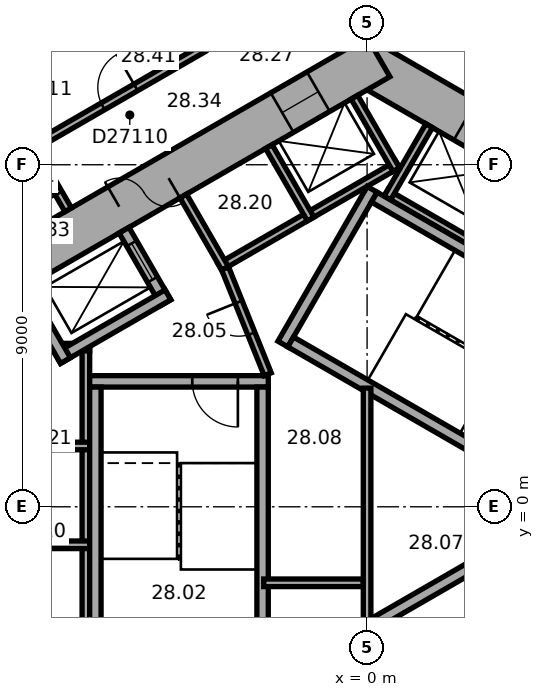
"""IFC4 building model, lengths in metres.
Left out: names, types, materials, properties, quantities, classifications, styles, units other than length and angle.
Written with IfcOpenShell. Run it as: python <this file> out.ifc"""

import sys

from ifc_helpers import new_model, si_unit, direction, frame, frame_2d, origin, place, context, subcontext, project, spatial, rectangle, extrude, element, fill, save


model = new_model("IFC4")
c1 = context("Model", 3, precision=1e-05, world=origin(), true_north=direction((0.0, 1.0)))
c2 = subcontext(c1, "Body", "Model", "MODEL_VIEW")
j1 = project(units=[si_unit("LENGTHUNIT", "METRE"), si_unit("PLANEANGLEUNIT", "RADIAN")], contexts=[c1])
p1 = place(None, origin())
s1 = spatial("IfcSite", under=j1, at=p1, CompositionType="ELEMENT")
p2 = place(p1, origin())
s2 = spatial("IfcBuilding", under=s1, at=p2, CompositionType="ELEMENT")
p3 = place(p2, frame((0.0, 0.0, 116.6)))
s3 = spatial("IfcBuildingStorey", under=s2, at=p3, CompositionType="ELEMENT", Elevation=116.6)
p4 = place(p3, frame((10.4, 5.658, 0.0), z_axis=(0.0, 0.0, 1.0), x_axis=(-0.866021384402, 0.500006961711, 0.0)))
e1 = element("IfcWall", 1, at=p4, inside=s3, PredefinedType="SHEAR", context=c2, shape_type="SweptSolid", body=[
    extrude(rectangle(XDim=12.355, YDim=1.2, at=frame_2d((6.178, 0.0))), origin(), (0.0, 0.0, 1.0), 3.3),
])
p5 = place(p4, frame((2.728, 0.0, 0.0)))
e2 = element("IfcOpeningElement", 2, at=p5, cuts=e1, PredefinedType="OPENING", context=c2, shape_type="SweptSolid", body=[
    extrude(rectangle(XDim=1.1, YDim=2.1, at=frame_2d((0.55, 1.05))), frame((0.0, 0.61, 0.0), z_axis=(0.0, -1.0, 0.0), x_axis=(1.0, 0.0, 0.0)), (0.0, 0.0, 1.0), 1.22),
])
p6 = place(p4, frame((5.328, 0.0, 0.0)))
e3 = element("IfcOpeningElement", 3, at=p6, cuts=e1, PredefinedType="OPENING", context=c2, shape_type="SweptSolid", body=[
    extrude(rectangle(XDim=1.1, YDim=2.1, at=frame_2d((0.55, 1.05))), frame((0.0, 0.61, 0.0), z_axis=(0.0, -1.0, 0.0), x_axis=(1.0, 0.0, 0.0)), (0.0, 0.0, 1.0), 1.22),
])
p7 = place(p4, frame((7.928, 0.0, 0.0)))
e4 = element("IfcOpeningElement", 4, at=p7, cuts=e1, PredefinedType="OPENING", context=c2, shape_type="SweptSolid", body=[
    extrude(rectangle(XDim=1.1, YDim=2.1, at=frame_2d((0.55, 1.05))), frame((0.0, 0.61, 0.0), z_axis=(0.0, -1.0, 0.0), x_axis=(1.0, 0.0, 0.0)), (0.0, 0.0, 1.0), 1.22),
])
p8 = place(p3, frame((0.3, 11.836, 0.0), z_axis=(0.0, 0.0, 1.0), x_axis=(-0.866021384402, -0.500006961711, 0.0)))
e5 = element("IfcWall", 5, at=p8, inside=s3, PredefinedType="SHEAR", context=c2, shape_type="SweptSolid", body=[
    extrude(rectangle(XDim=12.355, YDim=1.2, at=frame_2d((6.178, 0.0))), origin(), (0.0, 0.0, 1.0), 3.3),
])
p9 = place(p8, frame((6.378, 0.0, 0.0)))
e6 = element("IfcOpeningElement", 6, at=p9, cuts=e5, PredefinedType="OPENING", context=c2, shape_type="SweptSolid", body=[
    extrude(rectangle(XDim=1.5, YDim=2.1, at=frame_2d((0.75, 1.05))), frame((0.0, 0.61, 0.0), z_axis=(0.0, -1.0, 0.0), x_axis=(1.0, 0.0, 0.0)), (0.0, 0.0, 1.0), 1.22),
])
p10 = place(p8, frame((1.828, 0.0, 0.0)))
e7 = element("IfcOpeningElement", 7, at=p10, cuts=e5, PredefinedType="OPENING", context=c2, shape_type="SweptSolid", body=[
    extrude(rectangle(XDim=1.1, YDim=2.1, at=frame_2d((0.55, 1.05))), frame((0.0, 0.61, 0.0), z_axis=(0.0, -1.0, 0.0), x_axis=(1.0, 0.0, 0.0)), (0.0, 0.0, 1.0), 1.22),
])
p11 = place(p3, frame((7.424, 4.259, 0.0), z_axis=(0.0, 0.0, 1.0), x_axis=(-0.866026010844, 0.49999894854, 0.0)))
e8 = element("IfcWall", 8, at=p11, inside=s3, PredefinedType="PARTITIONING", context=c2, shape_type="SweptSolid", body=[
    extrude(rectangle(XDim=8.0, YDim=0.2, at=frame_2d((4.0, 0.0))), origin(), (0.0, 0.0, 1.0), 2.95),
])
p12 = place(p3, frame((0.532, 8.122, 0.0), z_axis=(0.0, 0.0, 1.0), x_axis=(0.500077893725, 0.86598042715, 0.0)))
e9 = element("IfcWall", 9, at=p12, inside=s3, PredefinedType="PARTITIONING", context=c2, shape_type="SweptSolid", body=[
    extrude(rectangle(XDim=2.2, YDim=0.2, at=frame_2d((1.1, 0.0))), origin(), (0.0, 0.0, 1.0), 2.95),
])
p13 = place(p3, frame((0.803, 9.009, 0.0), z_axis=(0.0, 0.0, 1.0), x_axis=(-0.866028230842, -0.499995103361, 0.0)))
e10 = element("IfcWall", 10, at=p13, inside=s3, PredefinedType="PARTITIONING", context=c2, shape_type="SweptSolid", body=[
    extrude(rectangle(XDim=5.4, YDim=0.2, at=frame_2d((2.7, 0.0))), origin(), (0.0, 0.0, 1.0), 2.95),
])
p14 = place(p3, frame((0.767, 8.872, 0.0), z_axis=(0.0, 0.0, 1.0), x_axis=(-0.499994660107, 0.866028486751, 0.0)))
e11 = element("IfcWall", 11, at=p14, inside=s3, PredefinedType="PARTITIONING", context=c2, shape_type="SweptSolid", body=[
    extrude(rectangle(XDim=2.2, YDim=0.2, at=frame_2d((1.1, 0.0))), origin(), (0.0, 0.0, 1.0), 2.95),
])
for number, where, z_axis, x_axis in (
    (12, (-1.485, 7.572, 0.0), (0.0, 0.0, 1.0), (-0.5, 0.866, 0.0)),
    (13, (-3.737, 6.272, 0.0), (0.0, 0.0, 1.0), (-0.5, 0.866, 0.0)),
):
    element("IfcWall", number, at=place(p3, frame(where, z_axis=z_axis, x_axis=x_axis)), inside=s3, PredefinedType="PARTITIONING", context=c2, shape_type="SweptSolid", body=[
        extrude(rectangle(XDim=2.2, YDim=0.2, at=frame_2d((1.1, 0.0))), origin(), (0.0, 0.0, 1.0), 2.95),
    ])
p15 = place(p3, frame((-7.4, 4.3, 0.0), z_axis=(0.0, 0.0, 1.0), x_axis=(0.0, -1.0, 0.0)))
e14 = element("IfcWall", 14, at=p15, inside=s3, PredefinedType="PARTITIONING", context=c2, shape_type="SweptSolid", body=[
    extrude(rectangle(XDim=8.0, YDim=0.2, at=frame_2d((4.0, 0.0))), origin(), (0.0, 0.0, 1.0), 2.95),
])
for number, where, z_axis, x_axis in (
    (15, (-7.3, 4.2, 0.0), (0.0, 0.0, 1.0), (-1.0, 0.0, 0.0)),
    (16, (-7.3, 1.6, 0.0), (0.0, 0.0, 1.0), (-1.0, 0.0, 0.0)),
    (17, (-7.3, -1.0, 0.0), (0.0, 0.0, 1.0), (-1.0, 0.0, 0.0)),
):
    element("IfcWall", number, at=place(p3, frame(where, z_axis=z_axis, x_axis=x_axis)), inside=s3, PredefinedType="PARTITIONING", context=c2, shape_type="SweptSolid", body=[
        extrude(rectangle(XDim=2.2, YDim=0.2, at=frame_2d((1.1, 0.0))), origin(), (0.0, 0.0, 1.0), 2.95),
    ])
p16 = place(p3, frame((-2.216, 4.282, 0.0), z_axis=(0.0, 0.0, 1.0), x_axis=(0.499977259774, 0.866038532462, 0.0)))
e18 = element("IfcWall", 18, at=p16, inside=s3, PredefinedType="SHEAR", context=c2, shape_type="SweptSolid", body=[
    extrude(rectangle(XDim=4.7, YDim=0.3, at=frame_2d((2.35, 0.0))), origin(), (0.0, 0.0, 1.0), 2.95),
])
for number, where, z_axis, x_axis in (
    (19, (4.103, 0.807, 0.0), (0.0, 0.0, 1.0), (-0.866, 0.5, 0.0)),
    (20, (6.303, 4.617, 0.0), (0.0, 0.0, 1.0), (-0.866, 0.5, 0.0)),
):
    element("IfcWall", number, at=place(p3, frame(where, z_axis=z_axis, x_axis=x_axis)), inside=s3, PredefinedType="SHEAR", context=c2, shape_type="SweptSolid", body=[
        extrude(rectangle(XDim=7.06, YDim=0.3, at=frame_2d((3.53, 0.0))), origin(), (0.0, 0.0, 1.0), 2.95),
    ])
p17 = place(p3, frame((-2.6, 3.3, 0.0), z_axis=(0.0, 0.0, 1.0), x_axis=(-1.0, 0.0, 0.0)))
e21 = element("IfcWall", 21, at=p17, inside=s3, PredefinedType="SHEAR", context=c2, shape_type="SweptSolid", body=[
    extrude(rectangle(XDim=4.7, YDim=0.3, at=frame_2d((2.35, 0.0))), origin(), (0.0, 0.0, 1.0), 2.95),
])
p18 = place(p17, frame((0.8, 0.0, 0.0)))
e22 = element("IfcOpeningElement", 22, at=p18, cuts=e21, PredefinedType="OPENING", context=c2, shape_type="SweptSolid", body=[
    extrude(rectangle(XDim=1.2, YDim=2.1, at=frame_2d((0.6, 1.05))), frame((0.0, 0.16, 0.0), z_axis=(0.0, -1.0, 0.0), x_axis=(1.0, 0.0, 0.0)), (0.0, 0.0, 1.0), 0.32),
])
for number, where, z_axis, x_axis in (
    (23, (-2.75, 3.15, 0.0), (0.0, 0.0, 1.0), (0.0, -1.0, 0.0)),
    (24, (-7.15, 3.15, 0.0), (0.0, 0.0, 1.0), (0.0, -1.0, 0.0)),
):
    element("IfcWall", number, at=place(p3, frame(where, z_axis=z_axis, x_axis=x_axis)), inside=s3, PredefinedType="SHEAR", context=c2, shape_type="SweptSolid", body=[
        extrude(rectangle(XDim=7.06, YDim=0.3, at=frame_2d((3.53, 0.0))), origin(), (0.0, 0.0, 1.0), 2.95),
    ])
p19 = place(p3, frame((-1.353, -3.957, 0.0), z_axis=(0.0, 0.0, 1.0), x_axis=(0.866027801685, 0.499995846692, 0.0)))
e25 = element("IfcWall", 25, at=p19, inside=s3, PredefinedType="SHEAR", context=c2, shape_type="SweptSolid", body=[
    extrude(rectangle(XDim=7.06, YDim=0.3, at=frame_2d((3.53, 0.0))), origin(), (0.0, 0.0, 1.0), 2.95),
])
p20 = place(p3, frame((-5.295, 5.372, 0.0), z_axis=(0.0, 0.0, 1.0), x_axis=(-0.500077893725, 0.86598042715, 0.0)))
e26 = element("IfcWall", 26, at=p20, inside=s3, PredefinedType="SHEAR", context=c2, shape_type="SweptSolid", body=[
    extrude(rectangle(XDim=2.2, YDim=0.3, at=frame_2d((1.1, 0.0))), origin(), (0.0, 0.0, 1.0), 2.95),
])
p21 = place(p20, frame((0.7, 0.0, 0.0)))
e27 = element("IfcOpeningElement", 27, at=p21, cuts=e26, PredefinedType="OPENING", context=c2, shape_type="SweptSolid", body=[
    extrude(rectangle(XDim=1.1, YDim=2.1, at=frame_2d((0.55, 1.05))), frame((0.0, 0.16, 0.0), z_axis=(0.0, -1.0, 0.0), x_axis=(1.0, 0.0, 0.0)), (0.0, 0.0, 1.0), 0.32),
])
p22 = place(p3, frame((-5.24, 5.577, 0.0), z_axis=(0.0, 0.0, 1.0), x_axis=(-0.866014461049, -0.500018952895, 0.0)))
e28 = element("IfcWall", 28, at=p22, inside=s3, PredefinedType="SHEAR", context=c2, shape_type="SweptSolid", body=[
    extrude(rectangle(XDim=3.35, YDim=0.3, at=frame_2d((1.675, 0.0))), origin(), (0.0, 0.0, 1.0), 2.95),
])
p23 = place(p3, frame((-7.937, 3.847, 0.0), z_axis=(0.0, 0.0, 1.0), x_axis=(-0.50002983664, 0.866008176907, 0.0)))
e29 = element("IfcWall", 29, at=p23, inside=s3, PredefinedType="SHEAR", context=c2, shape_type="SweptSolid", body=[
    extrude(rectangle(XDim=2.2, YDim=0.3, at=frame_2d((1.1, 0.0))), origin(), (0.0, 0.0, 1.0), 2.95),
])
p24 = place(p3, frame((-2.615, 3.487, 0.0), z_axis=(0.0, 0.0, 1.0), x_axis=(-0.373576831041, 0.92759924068, 0.0)))
e30 = element("IfcWall", 30, at=p24, inside=s3, PredefinedType="PARTITIONING", context=c2, shape_type="SweptSolid", body=[
    extrude(rectangle(XDim=3.002, YDim=0.2, at=frame_2d((1.501, 0.0))), origin(), (0.0, 0.0, 1.0), 2.95),
])
p25 = place(p24, frame((1.15, 0.0, 0.0)))
e31 = element("IfcOpeningElement", 31, at=p25, cuts=e30, PredefinedType="OPENING", context=c2, shape_type="SweptSolid", body=[
    extrude(rectangle(XDim=0.9, YDim=2.1, at=frame_2d((0.45, 1.05))), frame((0.0, 0.11, 0.0), z_axis=(0.0, -1.0, 0.0), x_axis=(1.0, 0.0, 0.0)), (0.0, 0.0, 1.0), 0.22),
])
p26 = place(p3, frame((-2.72, -2.0, 0.0), z_axis=(0.0, 0.0, 1.0), x_axis=(1.0, 0.0, 0.0)))
e32 = element("IfcWall", 32, at=p26, inside=s3, PredefinedType="PARTITIONING", context=c2, shape_type="SweptSolid", body=[
    extrude(rectangle(XDim=2.62, YDim=0.2, at=frame_2d((1.31, 0.0))), origin(), (0.0, 0.0, 1.0), 2.95),
])
p27 = place(p3, frame((0.0, -3.122, 0.0), z_axis=(0.0, 0.0, 1.0), x_axis=(0.0, 1.0, 0.0)))
e33 = element("IfcWall", 33, at=p27, inside=s3, PredefinedType="PARTITIONING", context=c2, shape_type="SweptSolid", body=[
    extrude(rectangle(XDim=6.245, YDim=0.2, at=frame_2d((3.122, 0.0))), origin(), (0.0, 0.0, 1.0), 2.95),
])
p28 = place(p3, frame((-7.865, 7.814, 0.0), z_axis=(0.0, 0.0, 1.0), x_axis=(-0.500004234368, 0.866022959057, 0.0)))
e34 = element("IfcWall", 34, at=p28, inside=s3, PredefinedType="PARTITIONING", context=c2, shape_type="SweptSolid", body=[
    extrude(rectangle(XDim=11.25, YDim=0.2, at=frame_2d((5.625, 0.0))), origin(), (0.0, 0.0, 1.0), 2.95),
])
p29 = place(p28, frame((0.5, 0.0, 0.0)))
e35 = element("IfcOpeningElement", 35, at=p29, cuts=e34, PredefinedType="OPENING", context=c2, shape_type="SweptSolid", body=[
    extrude(rectangle(XDim=0.9, YDim=2.1, at=frame_2d((0.45, 1.05))), frame((0.0, 0.11, 0.0), z_axis=(0.0, -1.0, 0.0), x_axis=(1.0, 0.0, 0.0)), (0.0, 0.0, 1.0), 0.22),
])
p30 = place(p3, frame((-4.309, 12.061, 0.0), z_axis=(0.0, 0.0, 1.0), x_axis=(-0.866020679205, -0.500008183122, 0.0)))
e36 = element("IfcWall", 36, at=p30, inside=s3, PredefinedType="PARTITIONING", context=c2, shape_type="SweptSolid", body=[
    extrude(rectangle(XDim=5.104, YDim=0.2, at=frame_2d((2.552, 0.0))), origin(), (0.0, 0.0, 1.0), 2.95),
])
p31 = place(p30, frame((2.052, 0.0, 0.0)))
e37 = element("IfcOpeningElement", 37, at=p31, cuts=e36, PredefinedType="OPENING", context=c2, shape_type="SweptSolid", body=[
    extrude(rectangle(XDim=1.0, YDim=2.1, at=frame_2d((0.5, 1.05))), frame((0.0, 0.11, 0.0), z_axis=(0.0, -1.0, 0.0), x_axis=(1.0, 0.0, 0.0)), (0.0, 0.0, 1.0), 0.22),
])
p32 = place(p3, frame((-3.237, 15.336, 0.0), z_axis=(0.0, 0.0, 1.0), x_axis=(-0.866022840924, -0.500004438978, 0.0)))
e38 = element("IfcWall", 38, at=p32, inside=s3, PredefinedType="PARTITIONING", context=c2, shape_type="SweptSolid", body=[
    extrude(rectangle(XDim=7.669, YDim=0.12, at=frame_2d((3.835, 0.0))), origin(), (0.0, 0.0, 1.0), 2.95),
])
p33 = place(p32, frame((6.169, 0.0, 0.0)))
e39 = element("IfcOpeningElement", 39, at=p33, cuts=e38, PredefinedType="OPENING", context=c2, shape_type="SweptSolid", body=[
    extrude(rectangle(XDim=1.0, YDim=2.1, at=frame_2d((0.5, 1.05))), frame((0.0, 0.07, 0.0), z_axis=(0.0, -1.0, 0.0), x_axis=(1.0, 0.0, 0.0)), (0.0, 0.0, 1.0), 0.14),
])
p34 = place(p32, frame((2.65, 0.0, 0.0)))
e40 = element("IfcOpeningElement", 40, at=p34, cuts=e38, PredefinedType="OPENING", context=c2, shape_type="SweptSolid", body=[
    extrude(rectangle(XDim=0.9, YDim=2.1, at=frame_2d((0.45, 1.05))), frame((0.0, 0.07, 0.0), z_axis=(0.0, -1.0, 0.0), x_axis=(1.0, 0.0, 0.0)), (0.0, 0.0, 1.0), 0.14),
])
p35 = place(p32, frame((4.285, 0.0, 0.0)))
e41 = element("IfcOpeningElement", 41, at=p35, cuts=e38, PredefinedType="OPENING", context=c2, shape_type="SweptSolid", body=[
    extrude(rectangle(XDim=0.9, YDim=2.1, at=frame_2d((0.45, 1.05))), frame((0.0, 0.07, 0.0), z_axis=(0.0, -1.0, 0.0), x_axis=(1.0, 0.0, 0.0)), (0.0, 0.0, 1.0), 0.14),
])
p36 = place(p9, origin())
e42 = element("IfcDoor", 42, at=p36, inside=s3, OperationType="DOUBLE_DOOR_SINGLE_SWING", PredefinedType="DOOR", context=c2, shape_type="SweptSolid", body=[
    extrude(rectangle(XDim=1.5, YDim=2.1, at=frame_2d((0.75, 1.05))), frame((0.0, 0.025, 0.0), z_axis=(0.0, -1.0, 0.0), x_axis=(1.0, 0.0, 0.0)), (0.0, 0.0, 1.0), 0.05),
])
fill(e6, e42)
p37 = place(p18, origin())
e43 = element("IfcDoor", 43, at=p37, inside=s3, OperationType="SINGLE_SWING_RIGHT", PredefinedType="DOOR", context=c2, shape_type="SweptSolid", body=[
    extrude(rectangle(XDim=1.2, YDim=2.1, at=frame_2d((0.6, 1.05))), frame((0.0, 0.025, 0.0), z_axis=(0.0, -1.0, 0.0), x_axis=(1.0, 0.0, 0.0)), (0.0, 0.0, 1.0), 0.05),
])
fill(e22, e43)
p38 = place(p25, origin())
e44 = element("IfcDoor", 44, at=p38, inside=s3, OperationType="SINGLE_SWING_LEFT", PredefinedType="DOOR", context=c2, shape_type="SweptSolid", body=[
    extrude(rectangle(XDim=0.9, YDim=2.1, at=frame_2d((0.45, 1.05))), frame((0.0, 0.025, 0.0), z_axis=(0.0, -1.0, 0.0), x_axis=(1.0, 0.0, 0.0)), (0.0, 0.0, 1.0), 0.05),
])
fill(e31, e44)
p39 = place(p21, origin())
e45 = element("IfcDoor", 45, at=p39, inside=s3, OperationType="DOUBLE_DOOR_SLIDING", PredefinedType="DOOR", context=c2, shape_type="SweptSolid", body=[
    extrude(rectangle(XDim=1.1, YDim=2.1, at=frame_2d((0.55, 1.05))), frame((0.0, 0.025, 0.0), z_axis=(0.0, -1.0, 0.0), x_axis=(1.0, 0.0, 0.0)), (0.0, 0.0, 1.0), 0.05),
])
fill(e27, e45)
p40 = place(p10, origin())
e46 = element("IfcDoor", 46, at=p40, inside=s3, OperationType="DOUBLE_DOOR_SLIDING", PredefinedType="DOOR", context=c2, shape_type="SweptSolid", body=[
    extrude(rectangle(XDim=1.1, YDim=2.1, at=frame_2d((0.55, 1.05))), frame((0.0, 0.025, 0.0), z_axis=(0.0, -1.0, 0.0), x_axis=(1.0, 0.0, 0.0)), (0.0, 0.0, 1.0), 0.05),
])
fill(e7, e46)
p41 = place(p31, origin())
e47 = element("IfcDoor", 47, at=p41, inside=s3, OperationType="SINGLE_SWING_LEFT", PredefinedType="DOOR", context=c2, shape_type="SweptSolid", body=[
    extrude(rectangle(XDim=1.0, YDim=2.1, at=frame_2d((0.5, 1.05))), frame((0.0, 0.025, 0.0), z_axis=(0.0, -1.0, 0.0), x_axis=(1.0, 0.0, 0.0)), (0.0, 0.0, 1.0), 0.05),
])
fill(e37, e47)
p42 = place(p29, origin())
e48 = element("IfcDoor", 48, at=p42, inside=s3, OperationType="SINGLE_SWING_LEFT", PredefinedType="DOOR", context=c2, shape_type="SweptSolid", body=[
    extrude(rectangle(XDim=0.9, YDim=2.1, at=frame_2d((0.45, 1.05))), frame((0.0, 0.025, 0.0), z_axis=(0.0, -1.0, 0.0), x_axis=(1.0, 0.0, 0.0)), (0.0, 0.0, 1.0), 0.05),
])
fill(e35, e48)
save(model, sys.argv[1])
